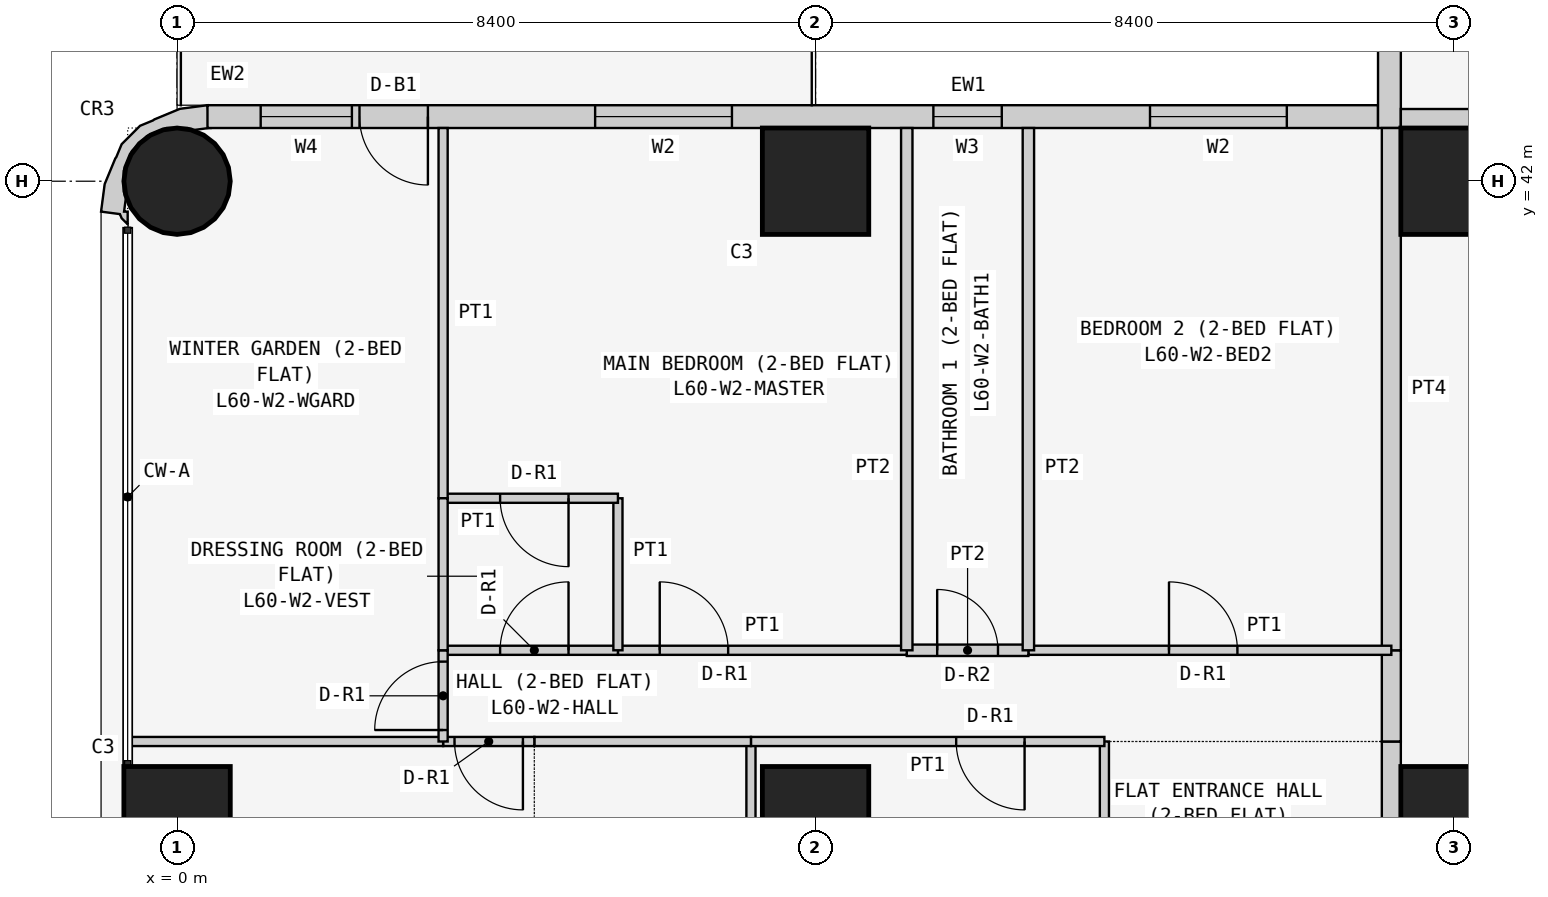
"""IFC4 building model, lengths in metres.
Left out: names, types, materials, properties, quantities, classifications, styles, units other than length and angle.
Written with IfcOpenShell. Run it as: python <this file> out.ifc"""

import sys

from ifc_helpers import new_model, si_unit, direction, frame, frame_2d, origin, origin_2d, place, context, subcontext, project, spatial, polyline, rectangle, circle, outline, extrude, element, fill, save


model = new_model("IFC4")
c1 = context("Model", 3, precision=1e-05, world=origin(), true_north=direction((0.0, 1.0)))
c2 = subcontext(c1, "Body", "Model", "MODEL_VIEW")
j1 = project(units=[si_unit("LENGTHUNIT", "METRE"), si_unit("PLANEANGLEUNIT", "RADIAN")], contexts=[c1])
p1 = place(None, origin())
s1 = spatial("IfcSite", under=j1, at=p1, CompositionType="ELEMENT")
p2 = place(p1, origin())
s2 = spatial("IfcBuilding", under=s1, at=p2, CompositionType="ELEMENT")
p3 = place(p2, frame((0.0, 0.0, 230.1)))
s3 = spatial("IfcBuildingStorey", under=s2, at=p3, CompositionType="ELEMENT", Elevation=230.1)
p4 = place(p3, frame((0.0, 33.6, 0.0), z_axis=(0.0, 0.0, 1.0), x_axis=(1.0, 0.0, 0.0)))
e1 = element("IfcColumn", 1, at=p4, inside=s3, PredefinedType="COLUMN", context=c2, shape_type="SweptSolid", body=[
    extrude(rectangle(XDim=1.4, YDim=1.4, at=origin_2d()), origin(), (0.0, 0.0, 1.0), 3.6),
])
p5 = place(p3, frame((0.0, 42.0, 0.0), z_axis=(0.0, 0.0, 1.0), x_axis=(1.0, 0.0, 0.0)))
e2 = element("IfcColumn", 2, at=p5, inside=s3, PredefinedType="COLUMN", context=c2, shape_type="SweptSolid", body=[
    extrude(circle(Radius=0.7, at=origin_2d()), origin(), (0.0, 0.0, 1.0), 3.6),
])
for number, where, z_axis, x_axis in (
    (3, (8.4, 33.6, 0.0), (0.0, 0.0, 1.0), (1.0, 0.0, 0.0)),
    (4, (8.4, 42.0, 0.0), (0.0, 0.0, 1.0), (1.0, 0.0, 0.0)),
    (5, (16.8, 33.6, 0.0), (0.0, 0.0, 1.0), (1.0, 0.0, 0.0)),
    (6, (16.8, 42.0, 0.0), (0.0, 0.0, 1.0), (1.0, 0.0, 0.0)),
):
    element("IfcColumn", number, at=place(p3, frame(where, z_axis=z_axis, x_axis=x_axis)), inside=s3, PredefinedType="COLUMN", context=c2, shape_type="SweptSolid", body=[
        extrude(rectangle(XDim=1.4, YDim=1.4, at=origin_2d()), origin(), (0.0, 0.0, 1.0), 3.6),
    ])
p6 = place(p3, frame((15.8, 42.85, 0.0), z_axis=(0.0, 0.0, 1.0), x_axis=(-1.0, 0.0, 0.0)))
e7 = element("IfcWall", 7, at=p6, inside=s3, PredefinedType="SOLIDWALL", context=c2, shape_type="SweptSolid", body=[
    extrude(rectangle(XDim=15.4, YDim=0.3, at=frame_2d((7.7, 0.0))), origin(), (0.0, 0.0, 1.0), 3.45),
])
p7 = place(p6, frame((1.2, 0.0, 0.9)))
e8 = element("IfcOpeningElement", 8, at=p7, cuts=e7, PredefinedType="OPENING", context=c2, shape_type="SweptSolid", body=[
    extrude(rectangle(XDim=1.8, YDim=1.5, at=frame_2d((0.9, 0.75))), frame((0.0, 0.16, 0.0), z_axis=(0.0, -1.0, 0.0), x_axis=(1.0, 0.0, 0.0)), (0.0, 0.0, 1.0), 0.32),
])
p8 = place(p6, frame((4.95, 0.0, 1.5)))
e9 = element("IfcOpeningElement", 9, at=p8, cuts=e7, PredefinedType="OPENING", context=c2, shape_type="SweptSolid", body=[
    extrude(rectangle(XDim=0.9, YDim=0.7, at=frame_2d((0.45, 0.35))), frame((0.0, 0.16, 0.0), z_axis=(0.0, -1.0, 0.0), x_axis=(1.0, 0.0, 0.0)), (0.0, 0.0, 1.0), 0.32),
])
p9 = place(p6, frame((8.5, 0.0, 0.9)))
e10 = element("IfcOpeningElement", 10, at=p9, cuts=e7, PredefinedType="OPENING", context=c2, shape_type="SweptSolid", body=[
    extrude(rectangle(XDim=1.8, YDim=1.5, at=frame_2d((0.9, 0.75))), frame((0.0, 0.16, 0.0), z_axis=(0.0, -1.0, 0.0), x_axis=(1.0, 0.0, 0.0)), (0.0, 0.0, 1.0), 0.32),
])
p10 = place(p6, frame((12.5, 0.0, 0.0)))
e11 = element("IfcOpeningElement", 11, at=p10, cuts=e7, PredefinedType="OPENING", context=c2, shape_type="SweptSolid", body=[
    extrude(rectangle(XDim=0.9, YDim=2.4, at=frame_2d((0.45, 1.2))), frame((0.0, 0.16, 0.0), z_axis=(0.0, -1.0, 0.0), x_axis=(1.0, 0.0, 0.0)), (0.0, 0.0, 1.0), 0.32),
])
p11 = place(p6, frame((13.5, 0.0, 0.9)))
e12 = element("IfcOpeningElement", 12, at=p11, cuts=e7, PredefinedType="OPENING", context=c2, shape_type="SweptSolid", body=[
    extrude(rectangle(XDim=1.2, YDim=1.5, at=frame_2d((0.6, 0.75))), frame((0.0, 0.16, 0.0), z_axis=(0.0, -1.0, 0.0), x_axis=(1.0, 0.0, 0.0)), (0.0, 0.0, 1.0), 0.32),
])
p12 = place(p3, frame((15.95, 50.0, 0.0), z_axis=(0.0, 0.0, 1.0), x_axis=(0.0, -1.0, 0.0)))
e13 = element("IfcWall", 13, at=p12, inside=s3, PredefinedType="SOLIDWALL", context=c2, shape_type="SweptSolid", body=[
    extrude(rectangle(XDim=7.3, YDim=0.3, at=frame_2d((3.65, 0.0))), origin(), (0.0, 0.0, 1.0), 3.45),
])
p13 = place(p12, frame((3.1, 0.0, 0.9)))
e14 = element("IfcOpeningElement", 14, at=p13, cuts=e13, PredefinedType="OPENING", context=c2, shape_type="SweptSolid", body=[
    extrude(rectangle(XDim=2.4, YDim=1.5, at=frame_2d((1.2, 0.75))), frame((0.0, 0.16, 0.0), z_axis=(0.0, -1.0, 0.0), x_axis=(1.0, 0.0, 0.0)), (0.0, 0.0, 1.0), 0.32),
])
p14 = place(p12, frame((0.75, 0.0, 0.9)))
e15 = element("IfcOpeningElement", 15, at=p14, cuts=e13, PredefinedType="OPENING", context=c2, shape_type="SweptSolid", body=[
    extrude(rectangle(XDim=1.2, YDim=1.5, at=frame_2d((0.6, 0.75))), frame((0.0, 0.16, 0.0), z_axis=(0.0, -1.0, 0.0), x_axis=(1.0, 0.0, 0.0)), (0.0, 0.0, 1.0), 0.32),
])
p15 = place(p3, frame((0.29, 42.724, 0.0), z_axis=(0.0, 0.0, 1.0), x_axis=(-0.898030234854, 0.439933741929, 0.0)))
e16 = element("IfcWall", 16, at=p15, inside=s3, PredefinedType="SOLIDWALL", context=c2, shape_type="SweptSolid", body=[
    extrude(outline(polyline([(-0.145, -0.044), (0.022, -0.296), (0.327, -0.094), (0.568, 0.18), (0.578, 0.199), (0.7, 0.338), (0.811, 0.661), (0.799, 0.846), (0.803, 0.866), (0.78, 1.231), (0.664, 1.577), (0.426, 1.497), (0.382, 1.536), (0.276, 1.572), (0.349, 1.423), (0.392, 1.444), (0.453, 1.261), (0.51, 1.211), (0.632, 0.961), (0.65, 0.683), (0.56, 0.419), (0.375, 0.21), (0.125, 0.087), (0.05, 0.082), (-0.127, -0.035), (-0.145, -0.044)])), origin(), (0.0, 0.0, 1.0), 3.45),
])
p16 = place(p3, frame((16.1, 42.825, 0.0), z_axis=(0.0, 0.0, 1.0), x_axis=(1.0, 0.0, 0.0)))
e17 = element("IfcWall", 17, at=p16, inside=s3, PredefinedType="PARTITIONING", context=c2, shape_type="SweptSolid", body=[
    extrude(rectangle(XDim=6.871, YDim=0.25, at=frame_2d((3.436, 0.0))), origin(), (0.0, 0.0, 1.0), 3.45),
])
p17 = place(p3, frame((15.975, 29.4, 0.0), z_axis=(0.0, 0.0, 1.0), x_axis=(0.0, 1.0, 0.0)))
e18 = element("IfcWall", 18, at=p17, inside=s3, PredefinedType="PARTITIONING", context=c2, shape_type="SweptSolid", body=[
    extrude(rectangle(XDim=5.229, YDim=0.25, at=frame_2d((2.615, 0.0))), origin(), (0.0, 0.0, 1.0), 3.45),
])
p18 = place(p17, frame((2.1, 0.0, 0.0)))
e19 = element("IfcOpeningElement", 19, at=p18, cuts=e18, PredefinedType="OPENING", context=c2, shape_type="SweptSolid", body=[
    extrude(rectangle(XDim=1.0, YDim=2.1, at=frame_2d((0.5, 1.05))), frame((0.0, 0.135, 0.0), z_axis=(0.0, -1.0, 0.0), x_axis=(1.0, 0.0, 0.0)), (0.0, 0.0, 1.0), 0.27),
])
p19 = place(p3, frame((15.975, 34.629, 0.0), z_axis=(0.0, 0.0, 1.0), x_axis=(0.0, 1.0, 0.0)))
e20 = element("IfcWall", 20, at=p19, inside=s3, PredefinedType="PARTITIONING", context=c2, shape_type="SweptSolid", body=[
    extrude(rectangle(XDim=1.2, YDim=0.25, at=frame_2d((0.6, 0.0))), origin(), (0.0, 0.0, 1.0), 3.45),
])
p20 = place(p3, frame((15.975, 35.829, 0.0), z_axis=(0.0, 0.0, 1.0), x_axis=(0.0, 1.0, 0.0)))
e21 = element("IfcWall", 21, at=p20, inside=s3, PredefinedType="PARTITIONING", context=c2, shape_type="SweptSolid", body=[
    extrude(rectangle(XDim=6.871, YDim=0.25, at=frame_2d((3.436, 0.0))), origin(), (0.0, 0.0, 1.0), 3.45),
])
for number, where, z_axis, x_axis in (
    (22, (12.2, 29.4, 0.0), (0.0, 0.0, 1.0), (0.0, 1.0, 0.0)),
    (23, (7.55, 29.4, 0.0), (0.0, 0.0, 1.0), (0.0, 1.0, 0.0)),
):
    element("IfcWall", number, at=place(p3, frame(where, z_axis=z_axis, x_axis=x_axis)), inside=s3, PredefinedType="PARTITIONING", context=c2, shape_type="SweptSolid", body=[
        extrude(rectangle(XDim=5.229, YDim=0.12, at=frame_2d((2.615, 0.0))), origin(), (0.0, 0.0, 1.0), 3.45),
    ])
p21 = place(p3, frame((7.55, 34.629, 0.0), z_axis=(0.0, 0.0, 1.0), x_axis=(1.0, 0.0, 0.0)))
e24 = element("IfcWall", 24, at=p21, inside=s3, PredefinedType="PARTITIONING", context=c2, shape_type="SweptSolid", body=[
    extrude(rectangle(XDim=4.65, YDim=0.12, at=frame_2d((2.325, 0.0))), origin(), (0.0, 0.0, 1.0), 3.45),
])
p22 = place(p21, frame((2.7, 0.0, 0.0)))
e25 = element("IfcOpeningElement", 25, at=p22, cuts=e24, PredefinedType="OPENING", context=c2, shape_type="SweptSolid", body=[
    extrude(rectangle(XDim=0.9, YDim=2.1, at=frame_2d((0.45, 1.05))), frame((0.0, 0.07, 0.0), z_axis=(0.0, -1.0, 0.0), x_axis=(1.0, 0.0, 0.0)), (0.0, 0.0, 1.0), 0.14),
])
p23 = place(p3, frame((4.7, 34.629, 0.0), z_axis=(0.0, 0.0, 1.0), x_axis=(1.0, 0.0, 0.0)))
e26 = element("IfcWall", 26, at=p23, inside=s3, PredefinedType="PARTITIONING", context=c2, shape_type="SweptSolid", body=[
    extrude(rectangle(XDim=2.85, YDim=0.12, at=frame_2d((1.425, 0.0))), origin(), (0.0, 0.0, 1.0), 3.45),
])
p24 = place(p3, frame((3.5, 34.629, 0.0), z_axis=(0.0, 0.0, 1.0), x_axis=(1.0, 0.0, 0.0)))
e27 = element("IfcWall", 27, at=p24, inside=s3, PredefinedType="PARTITIONING", context=c2, shape_type="SweptSolid", body=[
    extrude(rectangle(XDim=1.2, YDim=0.12, at=frame_2d((0.6, 0.0))), origin(), (0.0, 0.0, 1.0), 3.45),
])
p25 = place(p24, frame((0.15, 0.0, 0.0)))
e28 = element("IfcOpeningElement", 28, at=p25, cuts=e27, PredefinedType="OPENING", context=c2, shape_type="SweptSolid", body=[
    extrude(rectangle(XDim=0.9, YDim=2.1, at=frame_2d((0.45, 1.05))), frame((0.0, 0.07, 0.0), z_axis=(0.0, -1.0, 0.0), x_axis=(1.0, 0.0, 0.0)), (0.0, 0.0, 1.0), 0.14),
])
p26 = place(p3, frame((-0.65, 34.629, 0.0), z_axis=(0.0, 0.0, 1.0), x_axis=(1.0, 0.0, 0.0)))
e29 = element("IfcWall", 29, at=p26, inside=s3, PredefinedType="PARTITIONING", context=c2, shape_type="SweptSolid", body=[
    extrude(rectangle(XDim=4.15, YDim=0.12, at=frame_2d((2.075, 0.0))), origin(), (0.0, 0.0, 1.0), 3.45),
])
p27 = place(p3, frame((11.2, 35.829, 0.0), z_axis=(0.0, 0.0, 1.0), x_axis=(1.0, 0.0, 0.0)))
e30 = element("IfcWall", 30, at=p27, inside=s3, PredefinedType="PARTITIONING", context=c2, shape_type="SweptSolid", body=[
    extrude(rectangle(XDim=4.775, YDim=0.12, at=frame_2d((2.388, 0.0))), origin(), (0.0, 0.0, 1.0), 3.45),
])
p28 = place(p27, frame((1.85, 0.0, 0.0)))
e31 = element("IfcOpeningElement", 31, at=p28, cuts=e30, PredefinedType="OPENING", context=c2, shape_type="SweptSolid", body=[
    extrude(rectangle(XDim=0.9, YDim=2.1, at=frame_2d((0.45, 1.05))), frame((0.0, 0.07, 0.0), z_axis=(0.0, -1.0, 0.0), x_axis=(1.0, 0.0, 0.0)), (0.0, 0.0, 1.0), 0.14),
])
p29 = place(p3, frame((9.6, 35.829, 0.0), z_axis=(0.0, 0.0, 1.0), x_axis=(1.0, 0.0, 0.0)))
e32 = element("IfcWall", 32, at=p29, inside=s3, PredefinedType="PARTITIONING", context=c2, shape_type="SweptSolid", body=[
    extrude(rectangle(XDim=1.6, YDim=0.15, at=frame_2d((0.8, 0.0))), origin(), (0.0, 0.0, 1.0), 3.45),
])
p30 = place(p29, frame((0.4, 0.0, 0.0)))
e33 = element("IfcOpeningElement", 33, at=p30, cuts=e32, PredefinedType="OPENING", context=c2, shape_type="SweptSolid", body=[
    extrude(rectangle(XDim=0.8, YDim=2.1, at=frame_2d((0.4, 1.05))), frame((0.0, 0.085, 0.0), z_axis=(0.0, -1.0, 0.0), x_axis=(1.0, 0.0, 0.0)), (0.0, 0.0, 1.0), 0.17),
])
p31 = place(p3, frame((5.8, 35.829, 0.0), z_axis=(0.0, 0.0, 1.0), x_axis=(1.0, 0.0, 0.0)))
e34 = element("IfcWall", 34, at=p31, inside=s3, PredefinedType="PARTITIONING", context=c2, shape_type="SweptSolid", body=[
    extrude(rectangle(XDim=3.8, YDim=0.12, at=frame_2d((1.9, 0.0))), origin(), (0.0, 0.0, 1.0), 3.45),
])
p32 = place(p31, frame((0.55, 0.0, 0.0)))
e35 = element("IfcOpeningElement", 35, at=p32, cuts=e34, PredefinedType="OPENING", context=c2, shape_type="SweptSolid", body=[
    extrude(rectangle(XDim=0.9, YDim=2.1, at=frame_2d((0.45, 1.05))), frame((0.0, 0.07, 0.0), z_axis=(0.0, -1.0, 0.0), x_axis=(1.0, 0.0, 0.0)), (0.0, 0.0, 1.0), 0.14),
])
p33 = place(p3, frame((3.5, 35.829, 0.0), z_axis=(0.0, 0.0, 1.0), x_axis=(1.0, 0.0, 0.0)))
e36 = element("IfcWall", 36, at=p33, inside=s3, PredefinedType="PARTITIONING", context=c2, shape_type="SweptSolid", body=[
    extrude(rectangle(XDim=2.3, YDim=0.12, at=frame_2d((1.15, 0.0))), origin(), (0.0, 0.0, 1.0), 3.45),
])
p34 = place(p33, frame((0.75, 0.0, 0.0)))
e37 = element("IfcOpeningElement", 37, at=p34, cuts=e36, PredefinedType="OPENING", context=c2, shape_type="SweptSolid", body=[
    extrude(rectangle(XDim=0.9, YDim=2.1, at=frame_2d((0.45, 1.05))), frame((0.0, 0.07, 0.0), z_axis=(0.0, -1.0, 0.0), x_axis=(1.0, 0.0, 0.0)), (0.0, 0.0, 1.0), 0.14),
])
p35 = place(p3, frame((3.5, 34.629, 0.0), z_axis=(0.0, 0.0, 1.0), x_axis=(0.0, 1.0, 0.0)))
e38 = element("IfcWall", 38, at=p35, inside=s3, PredefinedType="PARTITIONING", context=c2, shape_type="SweptSolid", body=[
    extrude(rectangle(XDim=1.2, YDim=0.12, at=frame_2d((0.6, 0.0))), origin(), (0.0, 0.0, 1.0), 3.45),
])
p36 = place(p35, frame((0.151, 0.0, 0.0)))
e39 = element("IfcOpeningElement", 39, at=p36, cuts=e38, PredefinedType="OPENING", context=c2, shape_type="SweptSolid", body=[
    extrude(rectangle(XDim=0.9, YDim=2.1, at=frame_2d((0.45, 1.05))), frame((0.0, 0.07, 0.0), z_axis=(0.0, -1.0, 0.0), x_axis=(1.0, 0.0, 0.0)), (0.0, 0.0, 1.0), 0.14),
])
for number, where, z_axis, x_axis in (
    (40, (11.2, 35.829, 0.0), (0.0, 0.0, 1.0), (0.0, 1.0, 0.0)),
    (41, (9.6, 35.829, 0.0), (0.0, 0.0, 1.0), (0.0, 1.0, 0.0)),
):
    element("IfcWall", number, at=place(p3, frame(where, z_axis=z_axis, x_axis=x_axis)), inside=s3, PredefinedType="PARTITIONING", context=c2, shape_type="SweptSolid", body=[
        extrude(rectangle(XDim=6.871, YDim=0.15, at=frame_2d((3.436, 0.0))), origin(), (0.0, 0.0, 1.0), 3.45),
    ])
p37 = place(p3, frame((5.8, 35.829, 0.0), z_axis=(0.0, 0.0, 1.0), x_axis=(0.0, 1.0, 0.0)))
e42 = element("IfcWall", 42, at=p37, inside=s3, PredefinedType="PARTITIONING", context=c2, shape_type="SweptSolid", body=[
    extrude(rectangle(XDim=2.0, YDim=0.12, at=frame_2d((1.0, 0.0))), origin(), (0.0, 0.0, 1.0), 3.45),
])
p38 = place(p3, frame((5.8, 37.829, 0.0), z_axis=(0.0, 0.0, 1.0), x_axis=(-1.0, 0.0, 0.0)))
e43 = element("IfcWall", 43, at=p38, inside=s3, PredefinedType="PARTITIONING", context=c2, shape_type="SweptSolid", body=[
    extrude(rectangle(XDim=2.3, YDim=0.12, at=frame_2d((1.15, 0.0))), origin(), (0.0, 0.0, 1.0), 3.45),
])
p39 = place(p38, frame((0.65, 0.0, 0.0)))
e44 = element("IfcOpeningElement", 44, at=p39, cuts=e43, PredefinedType="OPENING", context=c2, shape_type="SweptSolid", body=[
    extrude(rectangle(XDim=0.9, YDim=2.1, at=frame_2d((0.45, 1.05))), frame((0.0, 0.07, 0.0), z_axis=(0.0, -1.0, 0.0), x_axis=(1.0, 0.0, 0.0)), (0.0, 0.0, 1.0), 0.14),
])
p40 = place(p3, frame((3.5, 37.829, 0.0), z_axis=(0.0, 0.0, 1.0), x_axis=(0.0, 1.0, 0.0)))
e45 = element("IfcWall", 45, at=p40, inside=s3, PredefinedType="PARTITIONING", context=c2, shape_type="SweptSolid", body=[
    extrude(rectangle(XDim=4.871, YDim=0.12, at=frame_2d((2.436, 0.0))), origin(), (0.0, 0.0, 1.0), 3.45),
])
p41 = place(p3, frame((3.5, 35.829, 0.0), z_axis=(0.0, 0.0, 1.0), x_axis=(0.0, 1.0, 0.0)))
e46 = element("IfcWall", 46, at=p41, inside=s3, PredefinedType="PARTITIONING", context=c2, shape_type="SweptSolid", body=[
    extrude(rectangle(XDim=2.0, YDim=0.12, at=frame_2d((1.0, 0.0))), origin(), (0.0, 0.0, 1.0), 3.45),
])
p42 = place(p7, origin())
e47 = element("IfcWindow", 47, at=p42, inside=s3, PartitioningType="SINGLE_PANEL", PredefinedType="WINDOW", context=c2, shape_type="SweptSolid", body=[
    extrude(rectangle(XDim=1.8, YDim=1.5, at=frame_2d((0.9, 0.75))), frame((0.0, 0.03, 0.0), z_axis=(0.0, -1.0, 0.0), x_axis=(1.0, 0.0, 0.0)), (0.0, 0.0, 1.0), 0.06),
])
fill(e8, e47)
p43 = place(p8, origin())
e48 = element("IfcWindow", 48, at=p43, inside=s3, PartitioningType="SINGLE_PANEL", PredefinedType="WINDOW", context=c2, shape_type="SweptSolid", body=[
    extrude(rectangle(XDim=0.9, YDim=0.7, at=frame_2d((0.45, 0.35))), frame((0.0, 0.03, 0.0), z_axis=(0.0, -1.0, 0.0), x_axis=(1.0, 0.0, 0.0)), (0.0, 0.0, 1.0), 0.06),
])
fill(e9, e48)
p44 = place(p9, origin())
e49 = element("IfcWindow", 49, at=p44, inside=s3, PartitioningType="SINGLE_PANEL", PredefinedType="WINDOW", context=c2, shape_type="SweptSolid", body=[
    extrude(rectangle(XDim=1.8, YDim=1.5, at=frame_2d((0.9, 0.75))), frame((0.0, 0.03, 0.0), z_axis=(0.0, -1.0, 0.0), x_axis=(1.0, 0.0, 0.0)), (0.0, 0.0, 1.0), 0.06),
])
fill(e10, e49)
p45 = place(p10, origin())
e50 = element("IfcDoor", 50, at=p45, inside=s3, OperationType="SINGLE_SWING_LEFT", PredefinedType="DOOR", context=c2, shape_type="SweptSolid", body=[
    extrude(rectangle(XDim=0.9, YDim=2.4, at=frame_2d((0.45, 1.2))), frame((0.0, 0.025, 0.0), z_axis=(0.0, -1.0, 0.0), x_axis=(1.0, 0.0, 0.0)), (0.0, 0.0, 1.0), 0.05),
])
fill(e11, e50)
p46 = place(p11, origin())
e51 = element("IfcWindow", 51, at=p46, inside=s3, PartitioningType="SINGLE_PANEL", PredefinedType="WINDOW", context=c2, shape_type="SweptSolid", body=[
    extrude(rectangle(XDim=1.2, YDim=1.5, at=frame_2d((0.6, 0.75))), frame((0.0, 0.03, 0.0), z_axis=(0.0, -1.0, 0.0), x_axis=(1.0, 0.0, 0.0)), (0.0, 0.0, 1.0), 0.06),
])
fill(e12, e51)
p47 = place(p22, frame((0.9, 0.0, 0.0), z_axis=(0.0, 0.0, 1.0), x_axis=(-1.0, 0.0, 0.0)))
e52 = element("IfcDoor", 52, at=p47, inside=s3, OperationType="SINGLE_SWING_LEFT", PredefinedType="DOOR", context=c2, shape_type="SweptSolid", body=[
    extrude(rectangle(XDim=0.9, YDim=2.1, at=frame_2d((0.45, 1.05))), frame((0.0, 0.025, 0.0), z_axis=(0.0, -1.0, 0.0), x_axis=(1.0, 0.0, 0.0)), (0.0, 0.0, 1.0), 0.05),
])
fill(e25, e52)
p48 = place(p25, frame((0.9, 0.0, 0.0), z_axis=(0.0, 0.0, 1.0), x_axis=(-1.0, 0.0, 0.0)))
e53 = element("IfcDoor", 53, at=p48, inside=s3, OperationType="SINGLE_SWING_LEFT", PredefinedType="DOOR", context=c2, shape_type="SweptSolid", body=[
    extrude(rectangle(XDim=0.9, YDim=2.1, at=frame_2d((0.45, 1.05))), frame((0.0, 0.025, 0.0), z_axis=(0.0, -1.0, 0.0), x_axis=(1.0, 0.0, 0.0)), (0.0, 0.0, 1.0), 0.05),
])
fill(e28, e53)
p49 = place(p28, origin())
e54 = element("IfcDoor", 54, at=p49, inside=s3, OperationType="SINGLE_SWING_LEFT", PredefinedType="DOOR", context=c2, shape_type="SweptSolid", body=[
    extrude(rectangle(XDim=0.9, YDim=2.1, at=frame_2d((0.45, 1.05))), frame((0.0, 0.025, 0.0), z_axis=(0.0, -1.0, 0.0), x_axis=(1.0, 0.0, 0.0)), (0.0, 0.0, 1.0), 0.05),
])
fill(e31, e54)
p50 = place(p30, origin())
e55 = element("IfcDoor", 55, at=p50, inside=s3, OperationType="SINGLE_SWING_LEFT", PredefinedType="DOOR", context=c2, shape_type="SweptSolid", body=[
    extrude(rectangle(XDim=0.8, YDim=2.1, at=frame_2d((0.4, 1.05))), frame((0.0, 0.025, 0.0), z_axis=(0.0, -1.0, 0.0), x_axis=(1.0, 0.0, 0.0)), (0.0, 0.0, 1.0), 0.05),
])
fill(e33, e55)
p51 = place(p32, origin())
e56 = element("IfcDoor", 56, at=p51, inside=s3, OperationType="SINGLE_SWING_LEFT", PredefinedType="DOOR", context=c2, shape_type="SweptSolid", body=[
    extrude(rectangle(XDim=0.9, YDim=2.1, at=frame_2d((0.45, 1.05))), frame((0.0, 0.025, 0.0), z_axis=(0.0, -1.0, 0.0), x_axis=(1.0, 0.0, 0.0)), (0.0, 0.0, 1.0), 0.05),
])
fill(e35, e56)
p52 = place(p34, origin())
e57 = element("IfcDoor", 57, at=p52, inside=s3, OperationType="SINGLE_SWING_RIGHT", PredefinedType="DOOR", context=c2, shape_type="SweptSolid", body=[
    extrude(rectangle(XDim=0.9, YDim=2.1, at=frame_2d((0.45, 1.05))), frame((0.0, 0.025, 0.0), z_axis=(0.0, -1.0, 0.0), x_axis=(1.0, 0.0, 0.0)), (0.0, 0.0, 1.0), 0.05),
])
fill(e37, e57)
p53 = place(p39, origin())
e58 = element("IfcDoor", 58, at=p53, inside=s3, OperationType="SINGLE_SWING_LEFT", PredefinedType="DOOR", context=c2, shape_type="SweptSolid", body=[
    extrude(rectangle(XDim=0.9, YDim=2.1, at=frame_2d((0.45, 1.05))), frame((0.0, 0.025, 0.0), z_axis=(0.0, -1.0, 0.0), x_axis=(1.0, 0.0, 0.0)), (0.0, 0.0, 1.0), 0.05),
])
fill(e44, e58)
p54 = place(p36, origin())
e59 = element("IfcDoor", 59, at=p54, inside=s3, OperationType="SINGLE_SWING_LEFT", PredefinedType="DOOR", context=c2, shape_type="SweptSolid", body=[
    extrude(rectangle(XDim=0.9, YDim=2.1, at=frame_2d((0.45, 1.05))), frame((0.0, 0.025, 0.0), z_axis=(0.0, -1.0, 0.0), x_axis=(1.0, 0.0, 0.0)), (0.0, 0.0, 1.0), 0.05),
])
fill(e39, e59)
save(model, sys.argv[1])
